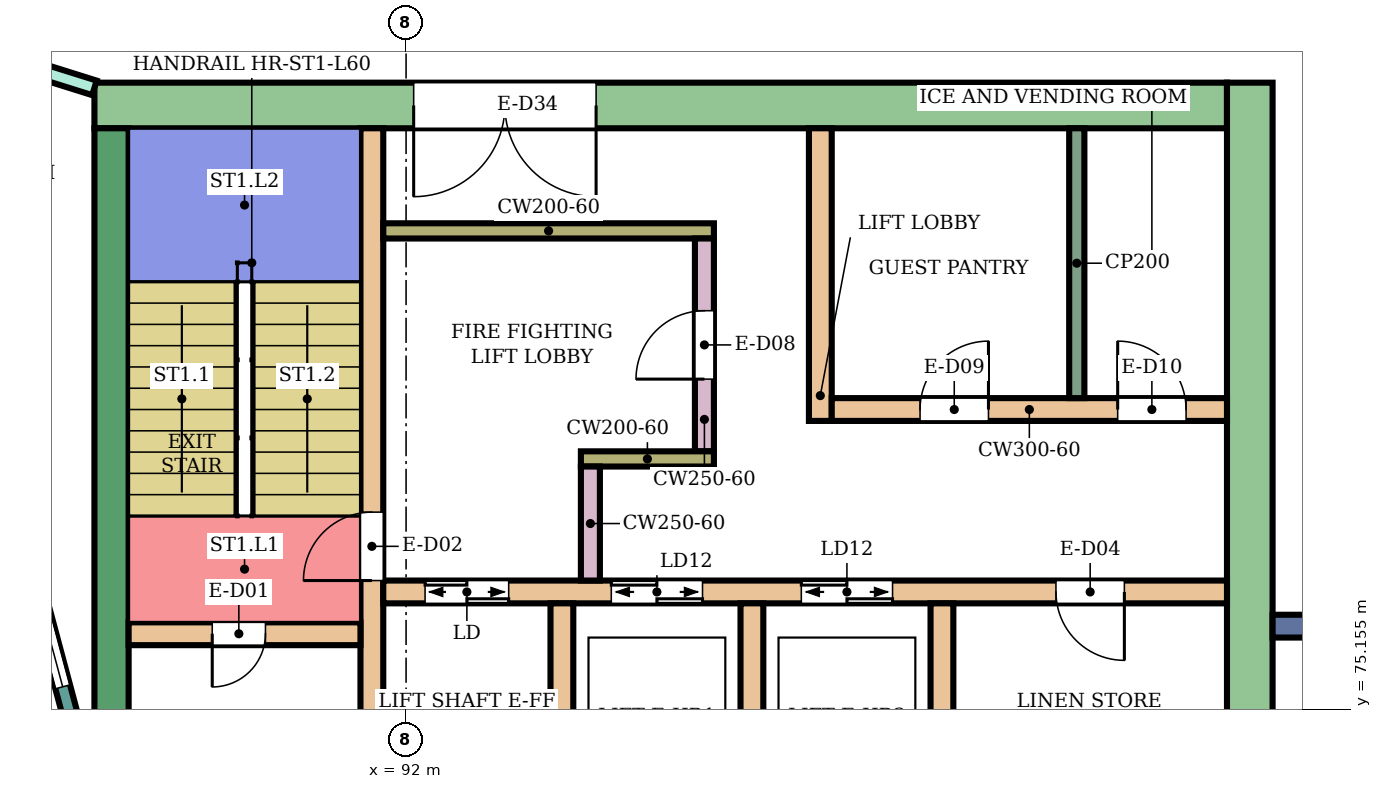
"""IFC4 building model, lengths in metres.
Left out: names, types, materials, properties, quantities, classifications, styles, units other than length and angle.
Written with IfcOpenShell. Run it as: python <this file> out.ifc"""

import sys

from ifc_helpers import new_model, si_unit, direction, frame, frame_2d, origin, place, context, subcontext, project, spatial, rectangle, extrude, element, fill, save


model = new_model("IFC4")
c1 = context("Model", 3, precision=1e-05, world=origin(), true_north=direction((0.0, 1.0)))
c2 = subcontext(c1, "Body", "Model", "MODEL_VIEW")
j1 = project(units=[si_unit("LENGTHUNIT", "METRE"), si_unit("PLANEANGLEUNIT", "RADIAN")], contexts=[c1])
p1 = place(None, origin())
s1 = spatial("IfcSite", under=j1, at=p1, CompositionType="ELEMENT")
p2 = place(p1, origin())
s2 = spatial("IfcBuilding", under=s1, at=p2, CompositionType="ELEMENT")
p3 = place(p2, frame((0.0, 0.0, 262.5)))
s3 = spatial("IfcBuildingStorey", under=s2, at=p3, CompositionType="ELEMENT", Elevation=262.5)
p4 = place(p3, frame((87.9, 83.1, 0.0), z_axis=(0.0, 0.0, 1.0), x_axis=(1.0, 0.0, 0.0)))
e1 = element("IfcWall", 1, at=p4, inside=s3, PredefinedType="SHEAR", context=c2, shape_type="SweptSolid", body=[
    extrude(rectangle(XDim=14.9, YDim=0.6, at=frame_2d((7.45, 0.0))), origin(), (0.0, 0.0, 1.0), 3.88),
])
p5 = place(p4, frame((4.2, 0.0, 0.0)))
e2 = element("IfcOpeningElement", 2, at=p5, cuts=e1, PredefinedType="OPENING", context=c2, shape_type="SweptSolid", body=[
    extrude(rectangle(XDim=2.4, YDim=2.4, at=frame_2d((1.2, 1.2))), frame((0.0, 0.31, 0.0), z_axis=(0.0, -1.0, 0.0), x_axis=(1.0, 0.0, 0.0)), (0.0, 0.0, 1.0), 0.62),
])
p6 = place(p3, frame((88.125, 75.0, 0.0), z_axis=(0.0, 0.0, 1.0), x_axis=(0.0, 1.0, 0.0)))
e3 = element("IfcWall", 3, at=p6, inside=s3, PredefinedType="SHEAR", context=c2, shape_type="SweptSolid", body=[
    extrude(rectangle(XDim=7.8, YDim=0.45, at=frame_2d((3.9, 0.0))), origin(), (0.0, 0.0, 1.0), 3.88),
])
p7 = place(p3, frame((103.1, 66.6, 0.0), z_axis=(0.0, 0.0, 1.0), x_axis=(0.0, 1.0, 0.0)))
e4 = element("IfcWall", 4, at=p7, inside=s3, PredefinedType="SHEAR", context=c2, shape_type="SweptSolid", body=[
    extrude(rectangle(XDim=16.8, YDim=0.6, at=frame_2d((8.4, 0.0))), origin(), (0.0, 0.0, 1.0), 3.88),
])
p8 = place(p3, frame((91.55, 75.0, 0.0), z_axis=(0.0, 0.0, 1.0), x_axis=(0.0, 1.0, 0.0)))
e5 = element("IfcWall", 5, at=p8, inside=s3, PredefinedType="SHEAR", context=c2, shape_type="SweptSolid", body=[
    extrude(rectangle(XDim=7.8, YDim=0.3, at=frame_2d((3.9, 0.0))), origin(), (0.0, 0.0, 1.0), 3.88),
])
p9 = place(p8, frame((1.85, 0.0, 0.0)))
e6 = element("IfcOpeningElement", 6, at=p9, cuts=e5, PredefinedType="OPENING", context=c2, shape_type="SweptSolid", body=[
    extrude(rectangle(XDim=0.9, YDim=2.1, at=frame_2d((0.45, 1.05))), frame((0.0, 0.16, 0.0), z_axis=(0.0, -1.0, 0.0), x_axis=(1.0, 0.0, 0.0)), (0.0, 0.0, 1.0), 0.32),
])
p10 = place(p3, frame((88.35, 76.15, 0.0), z_axis=(0.0, 0.0, 1.0), x_axis=(1.0, 0.0, 0.0)))
e7 = element("IfcWall", 7, at=p10, inside=s3, PredefinedType="SHEAR", context=c2, shape_type="SweptSolid", body=[
    extrude(rectangle(XDim=3.05, YDim=0.3, at=frame_2d((1.525, 0.0))), origin(), (0.0, 0.0, 1.0), 3.88),
])
p11 = place(p10, frame((1.1, 0.0, 0.0)))
e8 = element("IfcOpeningElement", 8, at=p11, cuts=e7, PredefinedType="OPENING", context=c2, shape_type="SweptSolid", body=[
    extrude(rectangle(XDim=0.7, YDim=2.0, at=frame_2d((0.35, 1.0))), frame((0.0, 0.16, 0.0), z_axis=(0.0, -1.0, 0.0), x_axis=(1.0, 0.0, 0.0)), (0.0, 0.0, 1.0), 0.32),
])
p12 = place(p3, frame((91.7, 76.7, 0.0), z_axis=(0.0, 0.0, 1.0), x_axis=(1.0, 0.0, 0.0)))
e9 = element("IfcWall", 9, at=p12, inside=s3, PredefinedType="SHEAR", context=c2, shape_type="SweptSolid", body=[
    extrude(rectangle(XDim=11.1, YDim=0.3, at=frame_2d((5.55, 0.0))), origin(), (0.0, 0.0, 1.0), 3.88),
])
p13 = place(p12, frame((0.55, 0.0, 0.0)))
e10 = element("IfcOpeningElement", 10, at=p13, cuts=e9, PredefinedType="OPENING", context=c2, shape_type="SweptSolid", body=[
    extrude(rectangle(XDim=1.1, YDim=2.1, at=frame_2d((0.55, 1.05))), frame((0.0, 0.16, 0.0), z_axis=(0.0, -1.0, 0.0), x_axis=(1.0, 0.0, 0.0)), (0.0, 0.0, 1.0), 0.32),
])
p14 = place(p12, frame((3.0, 0.0, 0.0)))
e11 = element("IfcOpeningElement", 11, at=p14, cuts=e9, PredefinedType="OPENING", context=c2, shape_type="SweptSolid", body=[
    extrude(rectangle(XDim=1.2, YDim=2.1, at=frame_2d((0.6, 1.05))), frame((0.0, 0.16, 0.0), z_axis=(0.0, -1.0, 0.0), x_axis=(1.0, 0.0, 0.0)), (0.0, 0.0, 1.0), 0.32),
])
p15 = place(p12, frame((5.5, 0.0, 0.0)))
e12 = element("IfcOpeningElement", 12, at=p15, cuts=e9, PredefinedType="OPENING", context=c2, shape_type="SweptSolid", body=[
    extrude(rectangle(XDim=1.2, YDim=2.1, at=frame_2d((0.6, 1.05))), frame((0.0, 0.16, 0.0), z_axis=(0.0, -1.0, 0.0), x_axis=(1.0, 0.0, 0.0)), (0.0, 0.0, 1.0), 0.32),
])
p16 = place(p12, frame((8.85, 0.0, 0.0)))
e13 = element("IfcOpeningElement", 13, at=p16, cuts=e9, PredefinedType="OPENING", context=c2, shape_type="SweptSolid", body=[
    extrude(rectangle(XDim=0.9, YDim=2.1, at=frame_2d((0.45, 1.05))), frame((0.0, 0.16, 0.0), z_axis=(0.0, -1.0, 0.0), x_axis=(1.0, 0.0, 0.0)), (0.0, 0.0, 1.0), 0.32),
])
for number, where, z_axis, x_axis in (
    (14, (94.05, 74.0, 0.0), (0.0, 0.0, 1.0), (0.0, 1.0, 0.0)),
    (15, (96.55, 74.0, 0.0), (0.0, 0.0, 1.0), (0.0, 1.0, 0.0)),
    (16, (99.05, 74.0, 0.0), (0.0, 0.0, 1.0), (0.0, 1.0, 0.0)),
):
    element("IfcWall", number, at=place(p3, frame(where, z_axis=z_axis, x_axis=x_axis)), inside=s3, PredefinedType="SHEAR", context=c2, shape_type="SweptSolid", body=[
        extrude(rectangle(XDim=2.55, YDim=0.3, at=frame_2d((1.275, 0.0))), origin(), (0.0, 0.0, 1.0), 3.88),
    ])
p17 = place(p3, frame((91.7, 81.45, 0.0), z_axis=(0.0, 0.0, 1.0), x_axis=(1.0, 0.0, 0.0)))
e17 = element("IfcWall", 17, at=p17, inside=s3, PredefinedType="SHEAR", context=c2, shape_type="SweptSolid", body=[
    extrude(rectangle(XDim=4.35, YDim=0.2, at=frame_2d((2.175, 0.0))), origin(), (0.0, 0.0, 1.0), 3.88),
])
p18 = place(p3, frame((95.925, 78.55, 0.0), z_axis=(0.0, 0.0, 1.0), x_axis=(0.0, 1.0, 0.0)))
e18 = element("IfcWall", 18, at=p18, inside=s3, PredefinedType="SHEAR", context=c2, shape_type="SweptSolid", body=[
    extrude(rectangle(XDim=2.8, YDim=0.25, at=frame_2d((1.4, 0.0))), origin(), (0.0, 0.0, 1.0), 3.88),
])
p19 = place(p18, frame((0.95, 0.0, 0.0)))
e19 = element("IfcOpeningElement", 19, at=p19, cuts=e18, PredefinedType="OPENING", context=c2, shape_type="SweptSolid", body=[
    extrude(rectangle(XDim=0.9, YDim=2.1, at=frame_2d((0.45, 1.05))), frame((0.0, 0.135, 0.0), z_axis=(0.0, -1.0, 0.0), x_axis=(1.0, 0.0, 0.0)), (0.0, 0.0, 1.0), 0.27),
])
p20 = place(p3, frame((94.3, 78.45, 0.0), z_axis=(0.0, 0.0, 1.0), x_axis=(1.0, 0.0, 0.0)))
e20 = element("IfcWall", 20, at=p20, inside=s3, PredefinedType="SHEAR", context=c2, shape_type="SweptSolid", body=[
    extrude(rectangle(XDim=1.75, YDim=0.2, at=frame_2d((0.875, 0.0))), origin(), (0.0, 0.0, 1.0), 3.88),
])
p21 = place(p3, frame((94.425, 76.85, 0.0), z_axis=(0.0, 0.0, 1.0), x_axis=(0.0, 1.0, 0.0)))
e21 = element("IfcWall", 21, at=p21, inside=s3, PredefinedType="SHEAR", context=c2, shape_type="SweptSolid", body=[
    extrude(rectangle(XDim=1.5, YDim=0.25, at=frame_2d((0.75, 0.0))), origin(), (0.0, 0.0, 1.0), 3.88),
])
p22 = place(p3, frame((97.45, 78.95, 0.0), z_axis=(0.0, 0.0, 1.0), x_axis=(0.0, 1.0, 0.0)))
e22 = element("IfcWall", 22, at=p22, inside=s3, PredefinedType="SHEAR", context=c2, shape_type="SweptSolid", body=[
    extrude(rectangle(XDim=3.85, YDim=0.3, at=frame_2d((1.925, 0.0))), origin(), (0.0, 0.0, 1.0), 3.88),
])
p23 = place(p3, frame((97.6, 79.1, 0.0), z_axis=(0.0, 0.0, 1.0), x_axis=(1.0, 0.0, 0.0)))
e23 = element("IfcWall", 23, at=p23, inside=s3, PredefinedType="SHEAR", context=c2, shape_type="SweptSolid", body=[
    extrude(rectangle(XDim=5.2, YDim=0.3, at=frame_2d((2.6, 0.0))), origin(), (0.0, 0.0, 1.0), 3.88),
])
p24 = place(p23, frame((1.162, 0.0, 0.0)))
e24 = element("IfcOpeningElement", 24, at=p24, cuts=e23, PredefinedType="OPENING", context=c2, shape_type="SweptSolid", body=[
    extrude(rectangle(XDim=0.9, YDim=2.1, at=frame_2d((0.45, 1.05))), frame((0.0, 0.16, 0.0), z_axis=(0.0, -1.0, 0.0), x_axis=(1.0, 0.0, 0.0)), (0.0, 0.0, 1.0), 0.32),
])
p25 = place(p23, frame((3.762, 0.0, 0.0)))
e25 = element("IfcOpeningElement", 25, at=p25, cuts=e23, PredefinedType="OPENING", context=c2, shape_type="SweptSolid", body=[
    extrude(rectangle(XDim=0.9, YDim=2.1, at=frame_2d((0.45, 1.05))), frame((0.0, 0.16, 0.0), z_axis=(0.0, -1.0, 0.0), x_axis=(1.0, 0.0, 0.0)), (0.0, 0.0, 1.0), 0.32),
])
p26 = place(p3, frame((103.4, 76.25, 0.0), z_axis=(0.0, 0.0, 1.0), x_axis=(1.0, 0.0, 0.0)))
e26 = element("IfcWall", 26, at=p26, inside=s3, PredefinedType="NOTDEFINED", context=c2, shape_type="SweptSolid", body=[
    extrude(rectangle(XDim=2.416, YDim=0.3, at=frame_2d((1.208, 0.0))), origin(), (0.0, 0.0, 1.0), 4.2),
])
p27 = place(p3, frame((87.604, 75.0, 0.0), z_axis=(0.0, 0.0, 1.0), x_axis=(-0.258789828301, 0.965933654434, 0.0)))
e27 = element("IfcWall", 27, at=p27, inside=s3, PredefinedType="NOTDEFINED", context=c2, shape_type="SweptSolid", body=[
    extrude(rectangle(XDim=3.936, YDim=0.2, at=frame_2d((1.968, 0.0))), origin(), (0.0, 0.0, 1.0), 4.2),
])
p28 = place(p27, frame((0.468, 0.0, 0.9)))
e28 = element("IfcOpeningElement", 28, at=p28, cuts=e27, PredefinedType="OPENING", context=c2, shape_type="SweptSolid", body=[
    extrude(rectangle(XDim=3.0, YDim=2.3, at=frame_2d((1.5, 1.15))), frame((0.0, 0.11, 0.0), z_axis=(0.0, -1.0, 0.0), x_axis=(1.0, 0.0, 0.0)), (0.0, 0.0, 1.0), 0.22),
])
p29 = place(p3, frame((85.587, 84.057, 0.0), z_axis=(0.0, 0.0, 1.0), x_axis=(0.954210767728, -0.299135104513, 0.0)))
e29 = element("IfcWall", 29, at=p29, inside=s3, PredefinedType="PARTITIONING", context=c2, shape_type="SweptSolid", body=[
    extrude(rectangle(XDim=2.424, YDim=0.2, at=frame_2d((1.212, 0.0))), origin(), (0.0, 0.0, 1.0), 3.75),
])
p30 = place(p3, frame((100.824, 79.25, 0.0), z_axis=(0.0, 0.0, 1.0), x_axis=(0.0, 1.0, 0.0)))
e30 = element("IfcWall", 30, at=p30, inside=s3, PredefinedType="PARTITIONING", context=c2, shape_type="SweptSolid", body=[
    extrude(rectangle(XDim=3.55, YDim=0.2, at=frame_2d((1.775, 0.0))), origin(), (0.0, 0.0, 1.0), 3.88),
])
p31 = place(p28, origin())
e31 = element("IfcWindow", 31, at=p31, inside=s3, PartitioningType="SINGLE_PANEL", PredefinedType="WINDOW", context=c2, shape_type="SweptSolid", body=[
    extrude(rectangle(XDim=3.0, YDim=2.3, at=frame_2d((1.5, 1.15))), frame((0.0, 0.03, 0.0), z_axis=(0.0, -1.0, 0.0), x_axis=(1.0, 0.0, 0.0)), (0.0, 0.0, 1.0), 0.06),
])
fill(e28, e31)
p32 = place(p11, frame((0.7, 0.0, 0.0), z_axis=(0.0, 0.0, 1.0), x_axis=(-1.0, 0.0, 0.0)))
e32 = element("IfcDoor", 32, at=p32, inside=s3, OperationType="SINGLE_SWING_RIGHT", PredefinedType="DOOR", context=c2, shape_type="SweptSolid", body=[
    extrude(rectangle(XDim=0.7, YDim=2.0, at=frame_2d((0.35, 1.0))), frame((0.0, 0.025, 0.0), z_axis=(0.0, -1.0, 0.0), x_axis=(1.0, 0.0, 0.0)), (0.0, 0.0, 1.0), 0.05),
])
fill(e8, e32)
p33 = place(p9, origin())
e33 = element("IfcDoor", 33, at=p33, inside=s3, OperationType="SINGLE_SWING_LEFT", PredefinedType="DOOR", context=c2, shape_type="SweptSolid", body=[
    extrude(rectangle(XDim=0.9, YDim=2.1, at=frame_2d((0.45, 1.05))), frame((0.0, 0.025, 0.0), z_axis=(0.0, -1.0, 0.0), x_axis=(1.0, 0.0, 0.0)), (0.0, 0.0, 1.0), 0.05),
])
fill(e6, e33)
p34 = place(p13, origin())
e34 = element("IfcDoor", 34, at=p34, inside=s3, OperationType="DOUBLE_DOOR_SLIDING", PredefinedType="DOOR", context=c2, shape_type="SweptSolid", body=[
    extrude(rectangle(XDim=1.1, YDim=2.1, at=frame_2d((0.55, 1.05))), frame((0.0, 0.025, 0.0), z_axis=(0.0, -1.0, 0.0), x_axis=(1.0, 0.0, 0.0)), (0.0, 0.0, 1.0), 0.05),
])
fill(e10, e34)
p35 = place(p14, origin())
e35 = element("IfcDoor", 35, at=p35, inside=s3, OperationType="DOUBLE_DOOR_SLIDING", PredefinedType="DOOR", context=c2, shape_type="SweptSolid", body=[
    extrude(rectangle(XDim=1.2, YDim=2.1, at=frame_2d((0.6, 1.05))), frame((0.0, 0.025, 0.0), z_axis=(0.0, -1.0, 0.0), x_axis=(1.0, 0.0, 0.0)), (0.0, 0.0, 1.0), 0.05),
])
fill(e11, e35)
p36 = place(p15, origin())
e36 = element("IfcDoor", 36, at=p36, inside=s3, OperationType="DOUBLE_DOOR_SLIDING", PredefinedType="DOOR", context=c2, shape_type="SweptSolid", body=[
    extrude(rectangle(XDim=1.2, YDim=2.1, at=frame_2d((0.6, 1.05))), frame((0.0, 0.025, 0.0), z_axis=(0.0, -1.0, 0.0), x_axis=(1.0, 0.0, 0.0)), (0.0, 0.0, 1.0), 0.05),
])
fill(e12, e36)
p37 = place(p16, frame((0.9, 0.0, 0.0), z_axis=(0.0, 0.0, 1.0), x_axis=(-1.0, 0.0, 0.0)))
e37 = element("IfcDoor", 37, at=p37, inside=s3, OperationType="SINGLE_SWING_LEFT", PredefinedType="DOOR", context=c2, shape_type="SweptSolid", body=[
    extrude(rectangle(XDim=0.9, YDim=2.1, at=frame_2d((0.45, 1.05))), frame((0.0, 0.025, 0.0), z_axis=(0.0, -1.0, 0.0), x_axis=(1.0, 0.0, 0.0)), (0.0, 0.0, 1.0), 0.05),
])
fill(e13, e37)
p38 = place(p19, origin())
e38 = element("IfcDoor", 38, at=p38, inside=s3, OperationType="SINGLE_SWING_LEFT", PredefinedType="DOOR", context=c2, shape_type="SweptSolid", body=[
    extrude(rectangle(XDim=0.9, YDim=2.1, at=frame_2d((0.45, 1.05))), frame((0.0, 0.025, 0.0), z_axis=(0.0, -1.0, 0.0), x_axis=(1.0, 0.0, 0.0)), (0.0, 0.0, 1.0), 0.05),
])
fill(e19, e38)
p39 = place(p24, origin())
e39 = element("IfcDoor", 39, at=p39, inside=s3, OperationType="SINGLE_SWING_RIGHT", PredefinedType="DOOR", context=c2, shape_type="SweptSolid", body=[
    extrude(rectangle(XDim=0.9, YDim=2.1, at=frame_2d((0.45, 1.05))), frame((0.0, 0.025, 0.0), z_axis=(0.0, -1.0, 0.0), x_axis=(1.0, 0.0, 0.0)), (0.0, 0.0, 1.0), 0.05),
])
fill(e24, e39)
p40 = place(p25, origin())
e40 = element("IfcDoor", 40, at=p40, inside=s3, OperationType="SINGLE_SWING_LEFT", PredefinedType="DOOR", context=c2, shape_type="SweptSolid", body=[
    extrude(rectangle(XDim=0.9, YDim=2.1, at=frame_2d((0.45, 1.05))), frame((0.0, 0.025, 0.0), z_axis=(0.0, -1.0, 0.0), x_axis=(1.0, 0.0, 0.0)), (0.0, 0.0, 1.0), 0.05),
])
fill(e25, e40)
p41 = place(p5, frame((2.4, 0.0, 0.0), z_axis=(0.0, 0.0, 1.0), x_axis=(-1.0, 0.0, 0.0)))
e41 = element("IfcDoor", 41, at=p41, inside=s3, OperationType="DOUBLE_DOOR_SINGLE_SWING", PredefinedType="DOOR", context=c2, shape_type="SweptSolid", body=[
    extrude(rectangle(XDim=2.4, YDim=2.4, at=frame_2d((1.2, 1.2))), frame((0.0, 0.025, 0.0), z_axis=(0.0, -1.0, 0.0), x_axis=(1.0, 0.0, 0.0)), (0.0, 0.0, 1.0), 0.05),
])
fill(e2, e41)
save(model, sys.argv[1])
